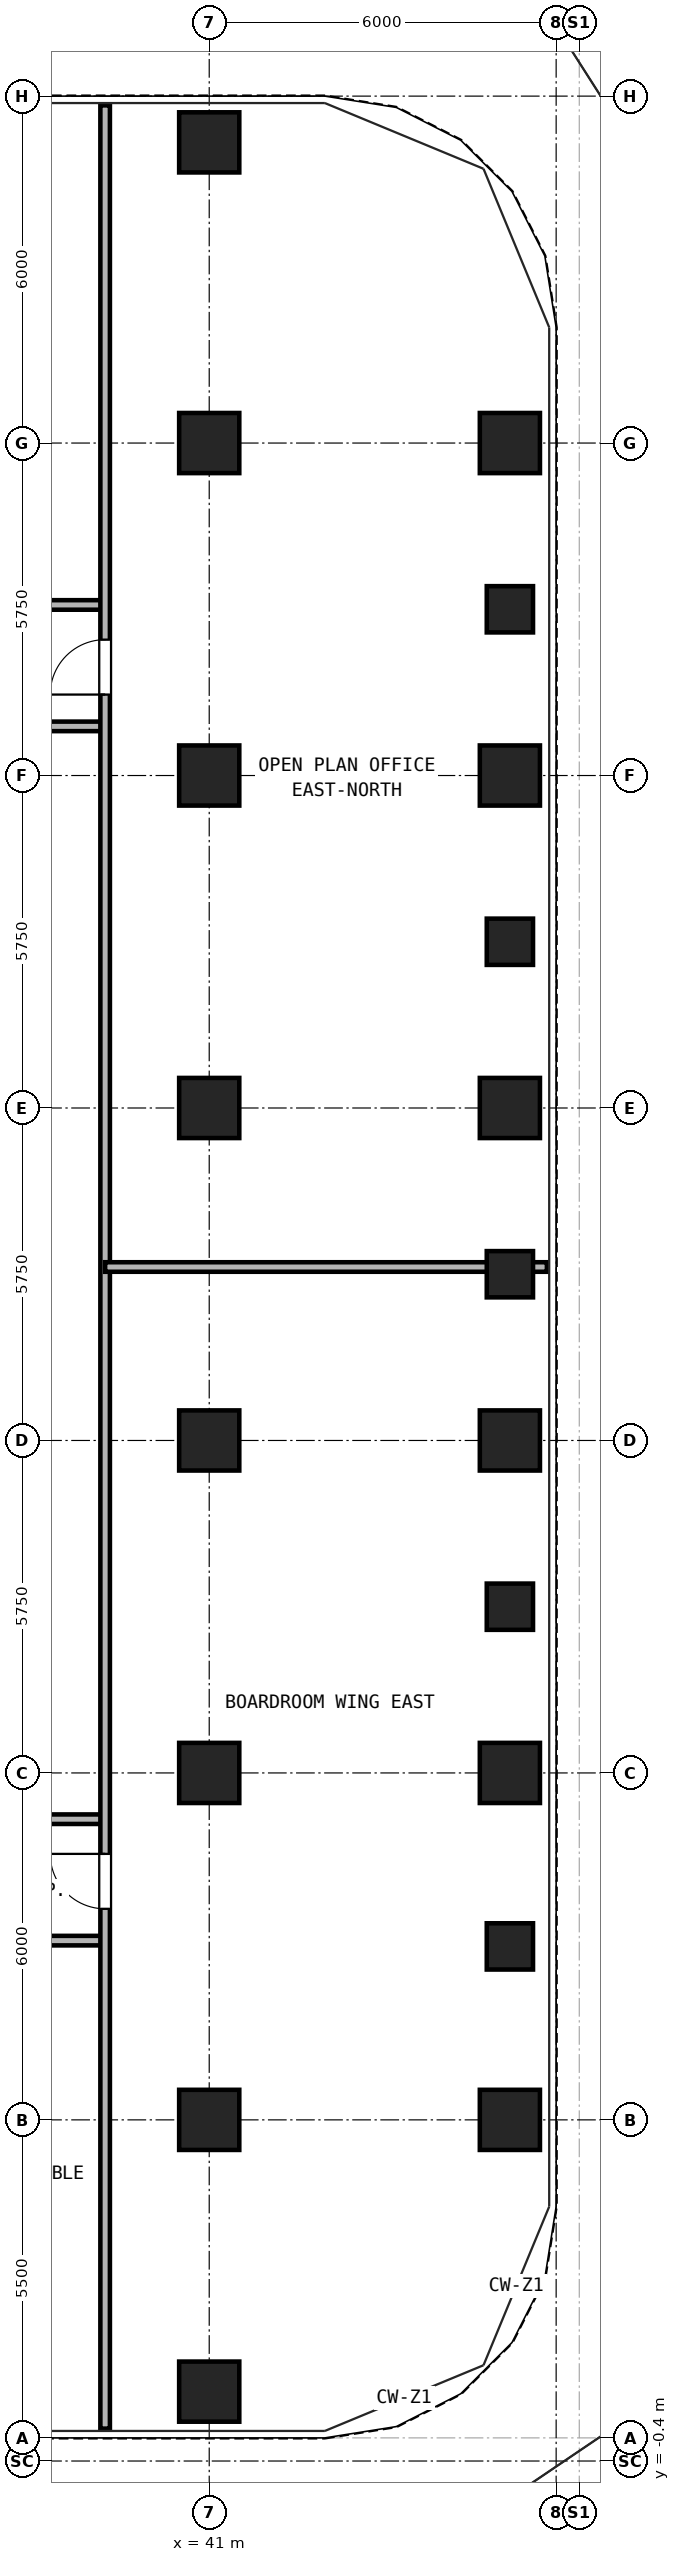
"""IFC4 building model, lengths in metres.
Left out: names, types, materials, properties, quantities, classifications, styles, units other than length and angle.
Written with IfcOpenShell. Run it as: python <this file> out.ifc"""

import sys

from ifc_helpers import new_model, si_unit, direction, frame, frame_2d, origin, origin_2d, place, context, subcontext, project, spatial, rectangle, hollow_rectangle, extrude, source, transform, mapped, element, fill, save


model = new_model("IFC4")
c1 = context("Model", 3, precision=1e-05, world=origin(), true_north=direction((0.0, 1.0)))
c2 = subcontext(c1, "Body", "Model", "MODEL_VIEW")
j1 = project(units=[si_unit("LENGTHUNIT", "METRE"), si_unit("PLANEANGLEUNIT", "RADIAN")], contexts=[c1])
p1 = place(None, origin())
s1 = spatial("IfcSite", under=j1, at=p1, CompositionType="ELEMENT")
p2 = place(p1, origin())
s2 = spatial("IfcBuilding", under=s1, at=p2, CompositionType="ELEMENT")
p3 = place(p2, frame((0.0, 0.0, 65.7)))
s3 = spatial("IfcBuildingStorey", under=s2, at=p3, CompositionType="ELEMENT", Elevation=65.7)
m1 = source(origin(), c2, "Body", "SweptSolid", [
    extrude(hollow_rectangle(XDim=1.04, YDim=1.04, WallThickness=0.065, at=origin_2d()), origin(), (0.0, 0.0, 1.0), 3.32),
])
for number, where, z_axis, x_axis in (
    (1, (41.0, 0.8, 0.0), (0.0, 0.0, 1.0), (1.0, 0.0, 0.0)),
    (2, (41.0, 39.7, 0.0), (0.0, 0.0, 1.0), (1.0, 0.0, 0.0)),
    (3, (46.2, 5.5, 0.0), (0.0, 0.0, 1.0), (1.0, 0.0, 0.0)),
    (4, (46.2, 11.5, 0.0), (0.0, 0.0, 1.0), (1.0, 0.0, 0.0)),
    (5, (46.2, 17.25, 0.0), (0.0, 0.0, 1.0), (1.0, 0.0, 0.0)),
    (6, (46.2, 23.0, 0.0), (0.0, 0.0, 1.0), (1.0, 0.0, 0.0)),
    (7, (46.2, 28.75, 0.0), (0.0, 0.0, 1.0), (1.0, 0.0, 0.0)),
    (8, (46.2, 34.5, 0.0), (0.0, 0.0, 1.0), (1.0, 0.0, 0.0)),
    (9, (41.0, 5.5, 0.0), (0.0, 0.0, 1.0), (1.0, 0.0, 0.0)),
    (10, (41.0, 11.5, 0.0), (0.0, 0.0, 1.0), (1.0, 0.0, 0.0)),
    (11, (41.0, 17.25, 0.0), (0.0, 0.0, 1.0), (1.0, 0.0, 0.0)),
    (12, (41.0, 23.0, 0.0), (0.0, 0.0, 1.0), (1.0, 0.0, 0.0)),
    (13, (41.0, 28.75, 0.0), (0.0, 0.0, 1.0), (1.0, 0.0, 0.0)),
    (14, (41.0, 34.5, 0.0), (0.0, 0.0, 1.0), (1.0, 0.0, 0.0)),
):
    element("IfcColumn", number, at=place(p3, frame(where, z_axis=z_axis, x_axis=x_axis)), inside=s3, PredefinedType="COLUMN", context=c2, shape_type="MappedRepresentation", body=[
        mapped(m1, transform((0.0, 0.0, 0.0), x_axis=(1.0, 0.0, 0.0), y_axis=(0.0, 1.0, 0.0), z_axis=(0.0, 0.0, 1.0), scale=1.0)),
    ])
m2 = source(origin(), c2, "Body", "SweptSolid", [
    extrude(hollow_rectangle(XDim=0.8, YDim=0.8, WallThickness=0.045, at=origin_2d()), origin(), (0.0, 0.0, 1.0), 3.32),
])
for number, where, z_axis, x_axis in (
    (15, (46.2, 8.5, 0.0), (0.0, 0.0, 1.0), (1.0, 0.0, 0.0)),
    (16, (46.2, 14.375, 0.0), (0.0, 0.0, 1.0), (1.0, 0.0, 0.0)),
    (17, (46.2, 20.125, 0.0), (0.0, 0.0, 1.0), (1.0, 0.0, 0.0)),
    (18, (46.2, 25.875, 0.0), (0.0, 0.0, 1.0), (1.0, 0.0, 0.0)),
    (19, (46.2, 31.625, 0.0), (0.0, 0.0, 1.0), (1.0, 0.0, 0.0)),
):
    element("IfcColumn", number, at=place(p3, frame(where, z_axis=z_axis, x_axis=x_axis)), inside=s3, PredefinedType="COLUMN", context=c2, shape_type="MappedRepresentation", body=[
        mapped(m2, transform((0.0, 0.0, 0.0), x_axis=(1.0, 0.0, 0.0), y_axis=(0.0, 1.0, 0.0), z_axis=(0.0, 0.0, 1.0), scale=1.0)),
    ])
p4 = place(p3, frame((7.8, 8.6, 0.0), z_axis=(0.0, 0.0, 1.0), x_axis=(1.0, 0.0, 0.0)))
e20 = element("IfcWall", 20, at=p4, inside=s3, PredefinedType="PARTITIONING", context=c2, shape_type="SweptSolid", body=[
    extrude(rectangle(XDim=31.4, YDim=0.165, at=frame_2d((15.7, 0.0))), origin(), (0.0, 0.0, 1.0), 2.898),
])
p5 = place(p4, frame((2.6, 0.0, 0.0)))
e21 = element("IfcOpeningElement", 21, at=p5, cuts=e20, PredefinedType="OPENING", context=c2, shape_type="SweptSolid", body=[
    extrude(rectangle(XDim=0.95, YDim=2.15, at=frame_2d((0.475, 1.075))), frame((0.0, 0.093, 0.0), z_axis=(0.0, -1.0, 0.0), x_axis=(1.0, 0.0, 0.0)), (0.0, 0.0, 1.0), 0.185),
])
p6 = place(p4, frame((8.8, 0.0, 0.0)))
e22 = element("IfcOpeningElement", 22, at=p6, cuts=e20, PredefinedType="OPENING", context=c2, shape_type="SweptSolid", body=[
    extrude(rectangle(XDim=0.95, YDim=2.15, at=frame_2d((0.475, 1.075))), frame((0.0, 0.093, 0.0), z_axis=(0.0, -1.0, 0.0), x_axis=(1.0, 0.0, 0.0)), (0.0, 0.0, 1.0), 0.185),
])
p7 = place(p4, frame((15.0, 0.0, 0.0)))
e23 = element("IfcOpeningElement", 23, at=p7, cuts=e20, PredefinedType="OPENING", context=c2, shape_type="SweptSolid", body=[
    extrude(rectangle(XDim=0.95, YDim=2.15, at=frame_2d((0.475, 1.075))), frame((0.0, 0.093, 0.0), z_axis=(0.0, -1.0, 0.0), x_axis=(1.0, 0.0, 0.0)), (0.0, 0.0, 1.0), 0.185),
])
p8 = place(p4, frame((21.2, 0.0, 0.0)))
e24 = element("IfcOpeningElement", 24, at=p8, cuts=e20, PredefinedType="OPENING", context=c2, shape_type="SweptSolid", body=[
    extrude(rectangle(XDim=0.95, YDim=2.15, at=frame_2d((0.475, 1.075))), frame((0.0, 0.093, 0.0), z_axis=(0.0, -1.0, 0.0), x_axis=(1.0, 0.0, 0.0)), (0.0, 0.0, 1.0), 0.185),
])
p9 = place(p4, frame((26.2, 0.0, 0.0)))
e25 = element("IfcOpeningElement", 25, at=p9, cuts=e20, PredefinedType="OPENING", context=c2, shape_type="SweptSolid", body=[
    extrude(rectangle(XDim=0.95, YDim=2.15, at=frame_2d((0.475, 1.075))), frame((0.0, 0.093, 0.0), z_axis=(0.0, -1.0, 0.0), x_axis=(1.0, 0.0, 0.0)), (0.0, 0.0, 1.0), 0.185),
])
p10 = place(p4, frame((29.5, 0.0, 0.0)))
e26 = element("IfcOpeningElement", 26, at=p10, cuts=e20, PredefinedType="OPENING", context=c2, shape_type="SweptSolid", body=[
    extrude(rectangle(XDim=0.92, YDim=2.1, at=frame_2d((0.46, 1.05))), frame((0.0, 0.093, 0.0), z_axis=(0.0, -1.0, 0.0), x_axis=(1.0, 0.0, 0.0)), (0.0, 0.0, 1.0), 0.185),
])
p11 = place(p3, frame((7.8, 31.7, 0.0), z_axis=(0.0, 0.0, 1.0), x_axis=(1.0, 0.0, 0.0)))
e27 = element("IfcWall", 27, at=p11, inside=s3, PredefinedType="PARTITIONING", context=c2, shape_type="SweptSolid", body=[
    extrude(rectangle(XDim=31.4, YDim=0.165, at=frame_2d((15.7, 0.0))), origin(), (0.0, 0.0, 1.0), 2.898),
])
p12 = place(p11, frame((3.85, 0.0, 0.0)))
e28 = element("IfcOpeningElement", 28, at=p12, cuts=e27, PredefinedType="OPENING", context=c2, shape_type="SweptSolid", body=[
    extrude(rectangle(XDim=0.95, YDim=2.15, at=frame_2d((0.475, 1.075))), frame((0.0, 0.093, 0.0), z_axis=(0.0, -1.0, 0.0), x_axis=(1.0, 0.0, 0.0)), (0.0, 0.0, 1.0), 0.185),
])
p13 = place(p11, frame((12.2, 0.0, 0.0)))
e29 = element("IfcOpeningElement", 29, at=p13, cuts=e27, PredefinedType="OPENING", context=c2, shape_type="SweptSolid", body=[
    extrude(rectangle(XDim=0.95, YDim=2.15, at=frame_2d((0.475, 1.075))), frame((0.0, 0.093, 0.0), z_axis=(0.0, -1.0, 0.0), x_axis=(1.0, 0.0, 0.0)), (0.0, 0.0, 1.0), 0.185),
])
p14 = place(p11, frame((20.2, 0.0, 0.0)))
e30 = element("IfcOpeningElement", 30, at=p14, cuts=e27, PredefinedType="OPENING", context=c2, shape_type="SweptSolid", body=[
    extrude(rectangle(XDim=0.95, YDim=2.15, at=frame_2d((0.475, 1.075))), frame((0.0, 0.093, 0.0), z_axis=(0.0, -1.0, 0.0), x_axis=(1.0, 0.0, 0.0)), (0.0, 0.0, 1.0), 0.185),
])
p15 = place(p11, frame((27.55, 0.0, 0.0)))
e31 = element("IfcOpeningElement", 31, at=p15, cuts=e27, PredefinedType="OPENING", context=c2, shape_type="SweptSolid", body=[
    extrude(rectangle(XDim=0.92, YDim=2.1, at=frame_2d((0.46, 1.05))), frame((0.0, 0.093, 0.0), z_axis=(0.0, -1.0, 0.0), x_axis=(1.0, 0.0, 0.0)), (0.0, 0.0, 1.0), 0.185),
])
for number, where, z_axis, x_axis in (
    (32, (30.7, 10.7, 0.0), (0.0, 0.0, 1.0), (1.0, 0.0, 0.0)),
    (33, (30.7, 29.6, 0.0), (0.0, 0.0, 1.0), (1.0, 0.0, 0.0)),
):
    element("IfcWall", number, at=place(p3, frame(where, z_axis=z_axis, x_axis=x_axis)), inside=s3, PredefinedType="PARTITIONING", context=c2, shape_type="SweptSolid", body=[
        extrude(rectangle(XDim=8.5, YDim=0.165, at=frame_2d((4.25, 0.0))), origin(), (0.0, 0.0, 1.0), 3.32),
    ])
p16 = place(p3, frame((39.2, 0.16, 0.0), z_axis=(0.0, 0.0, 1.0), x_axis=(0.0, 1.0, 0.0)))
e34 = element("IfcWall", 34, at=p16, inside=s3, PredefinedType="PARTITIONING", context=c2, shape_type="SweptSolid", body=[
    extrude(rectangle(XDim=40.18, YDim=0.165, at=frame_2d((20.09, 0.0))), origin(), (0.0, 0.0, 1.0), 3.32),
])
p17 = place(p16, frame((8.99, 0.0, 0.0)))
e35 = element("IfcOpeningElement", 35, at=p17, cuts=e34, PredefinedType="OPENING", context=c2, shape_type="SweptSolid", body=[
    extrude(rectangle(XDim=0.95, YDim=2.15, at=frame_2d((0.475, 1.075))), frame((0.0, 0.093, 0.0), z_axis=(0.0, -1.0, 0.0), x_axis=(1.0, 0.0, 0.0)), (0.0, 0.0, 1.0), 0.185),
])
p18 = place(p16, frame((29.99, 0.0, 0.0)))
e36 = element("IfcOpeningElement", 36, at=p18, cuts=e34, PredefinedType="OPENING", context=c2, shape_type="SweptSolid", body=[
    extrude(rectangle(XDim=0.95, YDim=2.15, at=frame_2d((0.475, 1.075))), frame((0.0, 0.093, 0.0), z_axis=(0.0, -1.0, 0.0), x_axis=(1.0, 0.0, 0.0)), (0.0, 0.0, 1.0), 0.185),
])
p19 = place(p3, frame((39.2, 20.25, 0.0), z_axis=(0.0, 0.0, 1.0), x_axis=(1.0, 0.0, 0.0)))
e37 = element("IfcWall", 37, at=p19, inside=s3, PredefinedType="PARTITIONING", context=c2, shape_type="SweptSolid", body=[
    extrude(rectangle(XDim=7.64, YDim=0.165, at=frame_2d((3.82, 0.0))), origin(), (0.0, 0.0, 1.0), 2.898),
])
p20 = place(p17, origin())
e38 = element("IfcDoor", 38, at=p20, inside=s3, OperationType="SINGLE_SWING_RIGHT", PredefinedType="DOOR", context=c2, shape_type="SweptSolid", body=[
    extrude(rectangle(XDim=0.95, YDim=2.15, at=frame_2d((0.475, 1.075))), frame((0.0, 0.025, 0.0), z_axis=(0.0, -1.0, 0.0), x_axis=(1.0, 0.0, 0.0)), (0.0, 0.0, 1.0), 0.05),
])
fill(e35, e38)
p21 = place(p18, origin())
e39 = element("IfcDoor", 39, at=p21, inside=s3, OperationType="SINGLE_SWING_LEFT", PredefinedType="DOOR", context=c2, shape_type="SweptSolid", body=[
    extrude(rectangle(XDim=0.95, YDim=2.15, at=frame_2d((0.475, 1.075))), frame((0.0, 0.025, 0.0), z_axis=(0.0, -1.0, 0.0), x_axis=(1.0, 0.0, 0.0)), (0.0, 0.0, 1.0), 0.05),
])
fill(e36, e39)
save(model, sys.argv[1])
